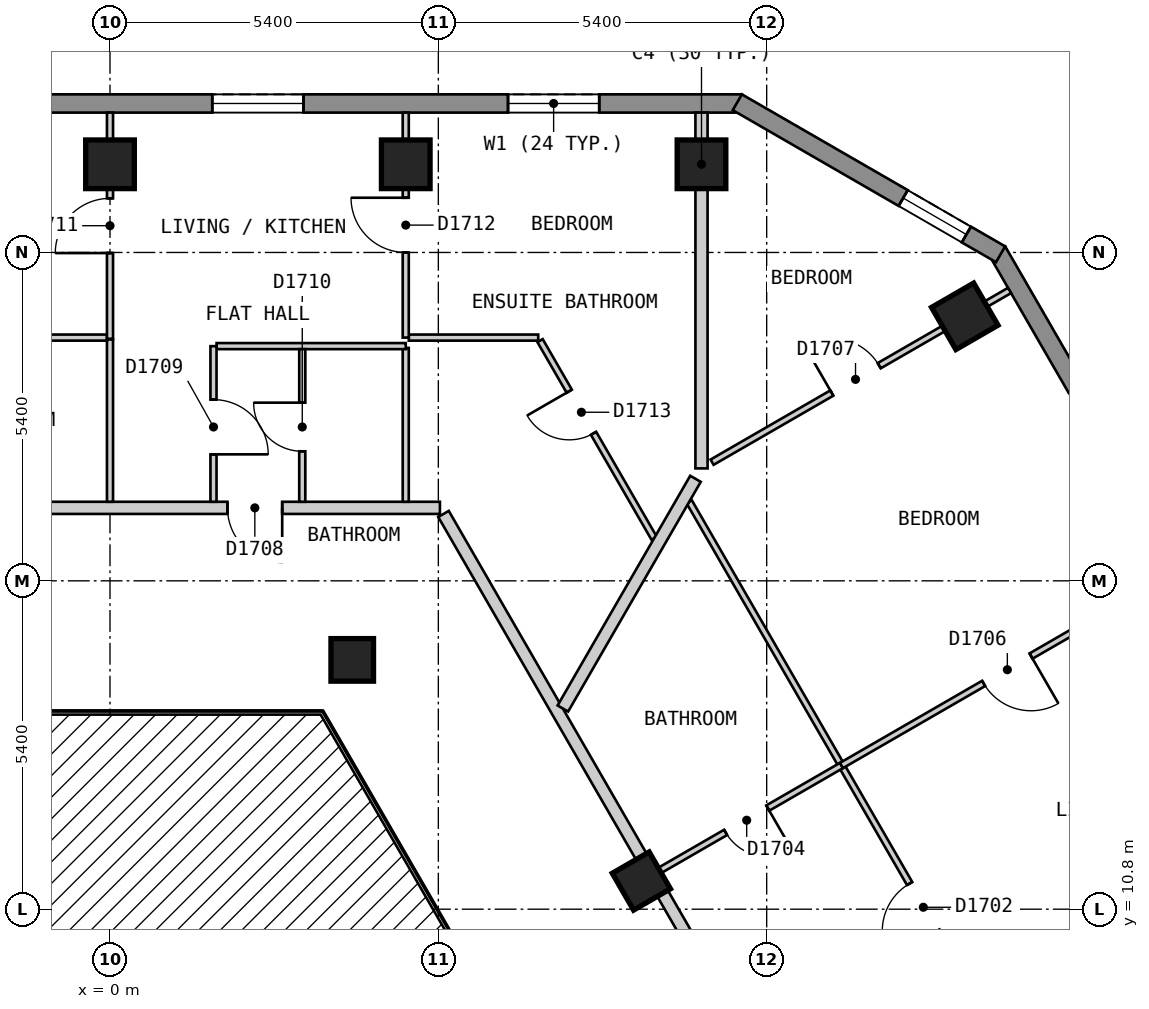
"""IFC4 building model, lengths in metres.
Left out: names, types, materials, properties, quantities, classifications, styles, units other than length and angle.
Written with IfcOpenShell. Run it as: python <this file> out.ifc"""

import sys

from ifc_helpers import new_model, si_unit, direction, frame, frame_2d, origin, origin_2d, place, context, subcontext, project, spatial, polyline, rectangle, outline, extrude, element, fill, save


model = new_model("IFC4")
c1 = context("Model", 3, precision=1e-05, world=origin(), true_north=direction((0.0, 1.0)))
c2 = subcontext(c1, "Body", "Model", "MODEL_VIEW")
j1 = project(units=[si_unit("LENGTHUNIT", "METRE"), si_unit("PLANEANGLEUNIT", "RADIAN")], contexts=[c1])
p1 = place(None, origin())
s1 = spatial("IfcSite", under=j1, at=p1, CompositionType="ELEMENT")
p2 = place(p1, origin())
s2 = spatial("IfcBuilding", under=s1, at=p2, CompositionType="ELEMENT")
p3 = place(p2, frame((0.0, 0.0, 181.2)))
s3 = spatial("IfcBuildingStorey", under=s2, at=p3, CompositionType="ELEMENT", Elevation=181.2)
for number, where, z_axis, x_axis in (
    (1, (9.728, 23.05, 0.0), (0.0, 0.0, 1.0), (-1.0, 0.0, 0.0)),
    (2, (4.864, 23.05, 0.0), (0.0, 0.0, 1.0), (-1.0, 0.0, 0.0)),
    (3, (0.0, 23.05, 0.0), (0.0, 0.0, 1.0), (-1.0, 0.0, 0.0)),
    (4, (14.058, 20.55, 0.0), (0.0, 0.0, 1.0), (-0.5, 0.866, 0.0)),
):
    element("IfcColumn", number, at=place(p3, frame(where, z_axis=z_axis, x_axis=x_axis)), inside=s3, PredefinedType="COLUMN", context=c2, shape_type="SweptSolid", body=[
        extrude(rectangle(XDim=0.8, YDim=0.8, at=origin_2d()), origin(), (0.0, 0.0, 1.0), 3.0),
    ])
for number, where, z_axis, x_axis in (
    (5, (8.739, 11.263, 0.0), (0.0, 0.0, 1.0), (-0.5, 0.866, 0.0)),
    (6, (3.984, 14.9, 0.0), (0.0, 0.0, 1.0), (1.0, 0.0, 0.0)),
):
    element("IfcColumn", number, at=place(p3, frame(where, z_axis=z_axis, x_axis=x_axis)), inside=s3, PredefinedType="COLUMN", context=c2, shape_type="SweptSolid", body=[
        extrude(rectangle(XDim=0.7, YDim=0.7, at=origin_2d()), origin(), (0.0, 0.0, 1.0), 3.0),
    ])
p4 = place(p3, frame((10.392, 24.05, 0.0), z_axis=(0.0, 0.0, 1.0), x_axis=(-1.0, 0.0, 0.0)))
e7 = element("IfcWall", 7, at=p4, inside=s3, PredefinedType="SOLIDWALL", context=c2, shape_type="SweptSolid", body=[
    extrude(outline(polyline([(0.0, -0.15), (20.784, -0.15), (20.704, 0.15), (0.08, 0.15), (0.0, -0.15)])), origin(), (0.0, 0.0, 1.0), 2.7),
])
p5 = place(p4, frame((2.346, 0.0, 0.15)))
e8 = element("IfcOpeningElement", 8, at=p5, cuts=e7, PredefinedType="OPENING", context=c2, shape_type="SweptSolid", body=[
    extrude(rectangle(XDim=1.5, YDim=2.1, at=frame_2d((0.75, 1.05))), frame((0.0, 0.16, 0.0), z_axis=(0.0, -1.0, 0.0), x_axis=(1.0, 0.0, 0.0)), (0.0, 0.0, 1.0), 0.32),
])
p6 = place(p4, frame((7.21, 0.0, 0.15)))
e9 = element("IfcOpeningElement", 9, at=p6, cuts=e7, PredefinedType="OPENING", context=c2, shape_type="SweptSolid", body=[
    extrude(rectangle(XDim=1.5, YDim=2.1, at=frame_2d((0.75, 1.05))), frame((0.0, 0.16, 0.0), z_axis=(0.0, -1.0, 0.0), x_axis=(1.0, 0.0, 0.0)), (0.0, 0.0, 1.0), 0.32),
])
p7 = place(p4, frame((12.074, 0.0, 0.15)))
e10 = element("IfcOpeningElement", 10, at=p7, cuts=e7, PredefinedType="OPENING", context=c2, shape_type="SweptSolid", body=[
    extrude(rectangle(XDim=1.5, YDim=2.1, at=frame_2d((0.75, 1.05))), frame((0.0, 0.16, 0.0), z_axis=(0.0, -1.0, 0.0), x_axis=(1.0, 0.0, 0.0)), (0.0, 0.0, 1.0), 0.32),
])
p8 = place(p4, frame((16.938, 0.0, 0.15)))
e11 = element("IfcOpeningElement", 11, at=p8, cuts=e7, PredefinedType="OPENING", context=c2, shape_type="SweptSolid", body=[
    extrude(rectangle(XDim=1.5, YDim=2.1, at=frame_2d((0.75, 1.05))), frame((0.0, 0.16, 0.0), z_axis=(0.0, -1.0, 0.0), x_axis=(1.0, 0.0, 0.0)), (0.0, 0.0, 1.0), 0.32),
])
p9 = place(p3, frame((26.024, 1.825, 0.0), z_axis=(0.0, 0.0, 1.0), x_axis=(-0.500010537973, 0.866019319597, 0.0)))
e12 = element("IfcWall", 12, at=p9, inside=s3, PredefinedType="SOLIDWALL", context=c2, shape_type="SweptSolid", body=[
    extrude(outline(polyline([(0.0, -0.15), (22.863, -0.15), (22.783, 0.15), (0.08, 0.15), (0.0, -0.15)])), origin(), (0.0, 0.0, 1.0), 2.7),
])
p10 = place(p9, frame((2.606, 0.0, 0.15)))
e13 = element("IfcOpeningElement", 13, at=p10, cuts=e12, PredefinedType="OPENING", context=c2, shape_type="SweptSolid", body=[
    extrude(rectangle(XDim=1.5, YDim=2.1, at=frame_2d((0.75, 1.05))), frame((0.0, 0.16, 0.0), z_axis=(0.0, -1.0, 0.0), x_axis=(1.0, 0.0, 0.0)), (0.0, 0.0, 1.0), 0.32),
])
p11 = place(p9, frame((7.99, 0.0, 0.15)))
e14 = element("IfcOpeningElement", 14, at=p11, cuts=e12, PredefinedType="OPENING", context=c2, shape_type="SweptSolid", body=[
    extrude(rectangle(XDim=1.5, YDim=2.1, at=frame_2d((0.75, 1.05))), frame((0.0, 0.16, 0.0), z_axis=(0.0, -1.0, 0.0), x_axis=(1.0, 0.0, 0.0)), (0.0, 0.0, 1.0), 0.32),
])
p12 = place(p9, frame((13.373, 0.0, 0.15)))
e15 = element("IfcOpeningElement", 15, at=p12, cuts=e12, PredefinedType="OPENING", context=c2, shape_type="SweptSolid", body=[
    extrude(rectangle(XDim=1.5, YDim=2.1, at=frame_2d((0.75, 1.05))), frame((0.0, 0.16, 0.0), z_axis=(0.0, -1.0, 0.0), x_axis=(1.0, 0.0, 0.0)), (0.0, 0.0, 1.0), 0.32),
])
p13 = place(p9, frame((18.758, 0.0, 0.15)))
e16 = element("IfcOpeningElement", 16, at=p13, cuts=e12, PredefinedType="OPENING", context=c2, shape_type="SweptSolid", body=[
    extrude(rectangle(XDim=1.5, YDim=2.1, at=frame_2d((0.75, 1.05))), frame((0.0, 0.16, 0.0), z_axis=(0.0, -1.0, 0.0), x_axis=(1.0, 0.0, 0.0)), (0.0, 0.0, 1.0), 0.32),
])
p14 = place(p3, frame((14.647, 21.57, 0.0), z_axis=(0.0, 0.0, 1.0), x_axis=(-0.866022959057, 0.500004234368, 0.0)))
e17 = element("IfcWall", 17, at=p14, inside=s3, PredefinedType="SOLIDWALL", context=c2, shape_type="SweptSolid", body=[
    extrude(outline(polyline([(0.0, -0.15), (5.0, -0.15), (4.92, 0.15), (0.08, 0.15), (0.0, -0.15)])), origin(), (0.0, 0.0, 1.0), 2.7),
])
p15 = place(p14, frame((0.65, 0.0, 0.15)))
e18 = element("IfcOpeningElement", 18, at=p15, cuts=e17, PredefinedType="OPENING", context=c2, shape_type="SweptSolid", body=[
    extrude(rectangle(XDim=1.2, YDim=2.1, at=frame_2d((0.6, 1.05))), frame((0.0, 0.16, 0.0), z_axis=(0.0, -1.0, 0.0), x_axis=(1.0, 0.0, 0.0)), (0.0, 0.0, 1.0), 0.32),
])
p16 = place(p3, frame((5.485, 17.3, 0.0), z_axis=(0.0, 0.0, 1.0), x_axis=(0.499965832213, -0.866045129667, 0.0)))
e19 = element("IfcWall", 19, at=p16, inside=s3, PredefinedType="PARTITIONING", context=c2, shape_type="SweptSolid", body=[
    extrude(rectangle(XDim=10.739, YDim=0.2, at=frame_2d((5.369, 0.0))), origin(), (0.0, 0.0, 1.0), 2.7),
])
p17 = place(p16, frame((9.047, 0.0, 0.0)))
e20 = element("IfcOpeningElement", 20, at=p17, cuts=e19, PredefinedType="OPENING", context=c2, shape_type="SweptSolid", body=[
    extrude(rectangle(XDim=1.0, YDim=2.1, at=frame_2d((0.5, 1.05))), frame((0.0, 0.11, 0.0), z_axis=(0.0, -1.0, 0.0), x_axis=(1.0, 0.0, 0.0)), (0.0, 0.0, 1.0), 0.22),
])
p18 = place(p3, frame((-5.311, 17.4, 0.0), z_axis=(0.0, 0.0, 1.0), x_axis=(1.0, 0.0, 0.0)))
e21 = element("IfcWall", 21, at=p18, inside=s3, PredefinedType="PARTITIONING", context=c2, shape_type="SweptSolid", body=[
    extrude(rectangle(XDim=10.737, YDim=0.2, at=frame_2d((5.369, 0.0))), origin(), (0.0, 0.0, 1.0), 2.7),
])
p19 = place(p18, frame((7.243, 0.0, 0.0)))
e22 = element("IfcOpeningElement", 22, at=p19, cuts=e21, PredefinedType="OPENING", context=c2, shape_type="SweptSolid", body=[
    extrude(rectangle(XDim=0.9, YDim=2.1, at=frame_2d((0.45, 1.05))), frame((0.0, 0.11, 0.0), z_axis=(0.0, -1.0, 0.0), x_axis=(1.0, 0.0, 0.0)), (0.0, 0.0, 1.0), 0.22),
])
p20 = place(p3, frame((7.073, 20.15, 0.0), z_axis=(0.0, 0.0, 1.0), x_axis=(0.499917691695, -0.866072919292, 0.0)))
e23 = element("IfcWall", 23, at=p20, inside=s3, PredefinedType="PARTITIONING", context=c2, shape_type="SweptSolid", body=[
    extrude(rectangle(XDim=3.753, YDim=0.1, at=frame_2d((1.876, 0.0))), origin(), (0.0, 0.0, 1.0), 2.7),
])
p21 = place(p20, frame((0.96, 0.0, 0.0)))
e24 = element("IfcOpeningElement", 24, at=p21, cuts=e23, PredefinedType="OPENING", context=c2, shape_type="SweptSolid", body=[
    extrude(rectangle(XDim=0.8, YDim=2.1, at=frame_2d((0.4, 1.05))), frame((0.0, 0.06, 0.0), z_axis=(0.0, -1.0, 0.0), x_axis=(1.0, 0.0, 0.0)), (0.0, 0.0, 1.0), 0.12),
])
p22 = place(p3, frame((9.526, 17.5, 0.0), z_axis=(0.0, 0.0, 1.0), x_axis=(0.500019134094, -0.866014356428, 0.0)))
e25 = element("IfcWall", 25, at=p22, inside=s3, PredefinedType="PARTITIONING", context=c2, shape_type="SweptSolid", body=[
    extrude(rectangle(XDim=10.97, YDim=0.1, at=frame_2d((5.485, 0.0))), origin(), (0.0, 0.0, 1.0), 2.7),
])
p23 = place(p22, frame((7.25, 0.0, 0.0)))
e26 = element("IfcOpeningElement", 26, at=p23, cuts=e25, PredefinedType="OPENING", context=c2, shape_type="SweptSolid", body=[
    extrude(rectangle(XDim=0.9, YDim=2.1, at=frame_2d((0.45, 1.05))), frame((0.0, 0.06, 0.0), z_axis=(0.0, -1.0, 0.0), x_axis=(1.0, 0.0, 0.0)), (0.0, 0.0, 1.0), 0.12),
])
p24 = place(p3, frame((0.0, 20.17, 0.0), z_axis=(0.0, 0.0, 1.0), x_axis=(0.0, -1.0, 0.0)))
e27 = element("IfcWall", 27, at=p24, inside=s3, PredefinedType="PARTITIONING", context=c2, shape_type="SweptSolid", body=[
    extrude(rectangle(XDim=2.67, YDim=0.1, at=frame_2d((1.335, 0.0))), origin(), (0.0, 0.0, 1.0), 2.7),
])
p25 = place(p3, frame((4.864, 20.03, 0.0), z_axis=(0.0, 0.0, 1.0), x_axis=(0.0, -1.0, 0.0)))
e28 = element("IfcWall", 28, at=p25, inside=s3, PredefinedType="PARTITIONING", context=c2, shape_type="SweptSolid", body=[
    extrude(rectangle(XDim=2.53, YDim=0.1, at=frame_2d((1.265, 0.0))), origin(), (0.0, 0.0, 1.0), 2.7),
])
p26 = place(p3, frame((1.753, 20.06, 0.0), z_axis=(0.0, 0.0, 1.0), x_axis=(1.0, 0.0, 0.0)))
e29 = element("IfcWall", 29, at=p26, inside=s3, PredefinedType="PARTITIONING", context=c2, shape_type="SweptSolid", body=[
    extrude(rectangle(XDim=3.111, YDim=0.1, at=frame_2d((1.556, 0.0))), origin(), (0.0, 0.0, 1.0), 2.7),
])
p27 = place(p3, frame((-6.985, 20.2, 0.0), z_axis=(0.0, 0.0, 1.0), x_axis=(1.0, 0.0, 0.0)))
e30 = element("IfcWall", 30, at=p27, inside=s3, PredefinedType="PARTITIONING", context=c2, shape_type="SweptSolid", body=[
    extrude(rectangle(XDim=6.935, YDim=0.1, at=frame_2d((3.468, 0.0))), origin(), (0.0, 0.0, 1.0), 2.7),
])
p28 = place(p27, frame((4.153, 0.0, 0.0)))
e31 = element("IfcOpeningElement", 31, at=p28, cuts=e30, PredefinedType="OPENING", context=c2, shape_type="SweptSolid", body=[
    extrude(rectangle(XDim=0.8, YDim=2.1, at=frame_2d((0.4, 1.05))), frame((0.0, 0.06, 0.0), z_axis=(0.0, -1.0, 0.0), x_axis=(1.0, 0.0, 0.0)), (0.0, 0.0, 1.0), 0.12),
])
p29 = place(p3, frame((4.914, 20.2, 0.0), z_axis=(0.0, 0.0, 1.0), x_axis=(1.0, 0.0, 0.0)))
e32 = element("IfcWall", 32, at=p29, inside=s3, PredefinedType="PARTITIONING", context=c2, shape_type="SweptSolid", body=[
    extrude(rectangle(XDim=2.129, YDim=0.1, at=frame_2d((1.064, 0.0))), origin(), (0.0, 0.0, 1.0), 2.7),
])
p30 = place(p3, frame((3.162, 17.5, 0.0), z_axis=(0.0, 0.0, 1.0), x_axis=(0.0, 1.0, 0.0)))
e33 = element("IfcWall", 33, at=p30, inside=s3, PredefinedType="PARTITIONING", context=c2, shape_type="SweptSolid", body=[
    extrude(rectangle(XDim=2.51, YDim=0.1, at=frame_2d((1.255, 0.0))), origin(), (0.0, 0.0, 1.0), 2.7),
])
p31 = place(p30, frame((0.83, 0.0, 0.0)))
e34 = element("IfcOpeningElement", 34, at=p31, cuts=e33, PredefinedType="OPENING", context=c2, shape_type="SweptSolid", body=[
    extrude(rectangle(XDim=0.8, YDim=2.1, at=frame_2d((0.4, 1.05))), frame((0.0, 0.06, 0.0), z_axis=(0.0, -1.0, 0.0), x_axis=(1.0, 0.0, 0.0)), (0.0, 0.0, 1.0), 0.12),
])
p32 = place(p3, frame((4.864, 20.2, 0.0), z_axis=(0.0, 0.0, 1.0), x_axis=(0.0, 1.0, 0.0)))
e35 = element("IfcWall", 35, at=p32, inside=s3, PredefinedType="PARTITIONING", context=c2, shape_type="SweptSolid", body=[
    extrude(rectangle(XDim=3.7, YDim=0.1, at=frame_2d((1.85, 0.0))), origin(), (0.0, 0.0, 1.0), 2.7),
])
p33 = place(p32, frame((1.4, 0.0, 0.0)))
e36 = element("IfcOpeningElement", 36, at=p33, cuts=e35, PredefinedType="OPENING", context=c2, shape_type="SweptSolid", body=[
    extrude(rectangle(XDim=0.9, YDim=2.1, at=frame_2d((0.45, 1.05))), frame((0.0, 0.06, 0.0), z_axis=(0.0, -1.0, 0.0), x_axis=(1.0, 0.0, 0.0)), (0.0, 0.0, 1.0), 0.12),
])
p34 = place(p3, frame((1.702, 17.5, 0.0), z_axis=(0.0, 0.0, 1.0), x_axis=(0.0, 1.0, 0.0)))
e37 = element("IfcWall", 37, at=p34, inside=s3, PredefinedType="PARTITIONING", context=c2, shape_type="SweptSolid", body=[
    extrude(rectangle(XDim=2.559, YDim=0.1, at=frame_2d((1.28, 0.0))), origin(), (0.0, 0.0, 1.0), 2.7),
])
p35 = place(p34, frame((0.78, 0.0, 0.0)))
e38 = element("IfcOpeningElement", 38, at=p35, cuts=e37, PredefinedType="OPENING", context=c2, shape_type="SweptSolid", body=[
    extrude(rectangle(XDim=0.9, YDim=2.1, at=frame_2d((0.45, 1.05))), frame((0.0, 0.06, 0.0), z_axis=(0.0, -1.0, 0.0), x_axis=(1.0, 0.0, 0.0)), (0.0, 0.0, 1.0), 0.12),
])
p36 = place(p3, frame((0.0, 20.18, 0.0), z_axis=(0.0, 0.0, 1.0), x_axis=(0.0, 1.0, 0.0)))
e39 = element("IfcWall", 39, at=p36, inside=s3, PredefinedType="PARTITIONING", context=c2, shape_type="SweptSolid", body=[
    extrude(rectangle(XDim=3.72, YDim=0.1, at=frame_2d((1.86, 0.0))), origin(), (0.0, 0.0, 1.0), 2.7),
])
p37 = place(p36, frame((1.41, 0.0, 0.0)))
e40 = element("IfcOpeningElement", 40, at=p37, cuts=e39, PredefinedType="OPENING", context=c2, shape_type="SweptSolid", body=[
    extrude(rectangle(XDim=0.9, YDim=2.1, at=frame_2d((0.45, 1.05))), frame((0.0, 0.06, 0.0), z_axis=(0.0, -1.0, 0.0), x_axis=(1.0, 0.0, 0.0)), (0.0, 0.0, 1.0), 0.12),
])
p38 = place(p3, frame((8.999, 11.413, 0.0), z_axis=(0.0, 0.0, 1.0), x_axis=(0.866019471182, 0.500010275428, 0.0)))
e41 = element("IfcWall", 41, at=p38, inside=s3, PredefinedType="PARTITIONING", context=c2, shape_type="SweptSolid", body=[
    extrude(rectangle(XDim=3.5, YDim=0.1, at=frame_2d((1.75, 0.0))), origin(), (0.0, 0.0, 1.0), 2.7),
])
p39 = place(p38, frame((1.3, 0.0, 0.0)))
e42 = element("IfcOpeningElement", 42, at=p39, cuts=e41, PredefinedType="OPENING", context=c2, shape_type="SweptSolid", body=[
    extrude(rectangle(XDim=0.8, YDim=2.1, at=frame_2d((0.4, 1.05))), frame((0.0, 0.06, 0.0), z_axis=(0.0, -1.0, 0.0), x_axis=(1.0, 0.0, 0.0)), (0.0, 0.0, 1.0), 0.12),
])
p40 = place(p3, frame((9.902, 18.151, 0.0), z_axis=(0.0, 0.0, 1.0), x_axis=(0.866032278734, 0.499988092049, 0.0)))
e43 = element("IfcWall", 43, at=p40, inside=s3, PredefinedType="PARTITIONING", context=c2, shape_type="SweptSolid", body=[
    extrude(rectangle(XDim=5.649, YDim=0.1, at=frame_2d((2.824, 0.0))), origin(), (0.0, 0.0, 1.0), 2.7),
])
p41 = place(p40, frame((2.274, 0.0, 0.0)))
e44 = element("IfcOpeningElement", 44, at=p41, cuts=e43, PredefinedType="OPENING", context=c2, shape_type="SweptSolid", body=[
    extrude(rectangle(XDim=0.9, YDim=2.1, at=frame_2d((0.45, 1.05))), frame((0.0, 0.06, 0.0), z_axis=(0.0, -1.0, 0.0), x_axis=(1.0, 0.0, 0.0)), (0.0, 0.0, 1.0), 0.12),
])
p42 = place(p3, frame((7.448, 14.1, 0.0), z_axis=(0.0, 0.0, 1.0), x_axis=(0.499961462843, 0.866047652079, 0.0)))
e45 = element("IfcWall", 45, at=p42, inside=s3, PredefinedType="PARTITIONING", context=c2, shape_type="SweptSolid", body=[
    extrude(rectangle(XDim=4.362, YDim=0.2, at=frame_2d((2.181, 0.0))), origin(), (0.0, 0.0, 1.0), 2.7),
])
p43 = place(p3, frame((9.728, 18.049, 0.0), z_axis=(0.0, 0.0, 1.0), x_axis=(0.0, 1.0, 0.0)))
e46 = element("IfcWall", 46, at=p43, inside=s3, PredefinedType="PARTITIONING", context=c2, shape_type="SweptSolid", body=[
    extrude(rectangle(XDim=5.851, YDim=0.2, at=frame_2d((2.925, 0.0))), origin(), (0.0, 0.0, 1.0), 2.7),
])
p44 = place(p3, frame((14.722, 8.5, 0.0), z_axis=(0.0, 0.0, 1.0), x_axis=(0.866035871367, 0.499981869177, 0.0)))
e47 = element("IfcWall", 47, at=p44, inside=s3, PredefinedType="PARTITIONING", context=c2, shape_type="SweptSolid", body=[
    extrude(rectangle(XDim=6.3, YDim=0.1, at=frame_2d((3.15, 0.0))), origin(), (0.0, 0.0, 1.0), 2.7),
])
p45 = place(p44, frame((2.7, 0.0, 0.0)))
e48 = element("IfcOpeningElement", 48, at=p45, cuts=e47, PredefinedType="OPENING", context=c2, shape_type="SweptSolid", body=[
    extrude(rectangle(XDim=0.9, YDim=2.1, at=frame_2d((0.45, 1.05))), frame((0.0, 0.06, 0.0), z_axis=(0.0, -1.0, 0.0), x_axis=(1.0, 0.0, 0.0)), (0.0, 0.0, 1.0), 0.12),
])
p46 = place(p3, frame((12.03, 13.163, 0.0), z_axis=(0.0, 0.0, 1.0), x_axis=(0.866035871367, 0.499981869177, 0.0)))
e49 = element("IfcWall", 49, at=p46, inside=s3, PredefinedType="PARTITIONING", context=c2, shape_type="SweptSolid", body=[
    extrude(rectangle(XDim=6.3, YDim=0.1, at=frame_2d((3.15, 0.0))), origin(), (0.0, 0.0, 1.0), 2.7),
])
p47 = place(p46, frame((2.7, 0.0, 0.0)))
e50 = element("IfcOpeningElement", 50, at=p47, cuts=e49, PredefinedType="OPENING", context=c2, shape_type="SweptSolid", body=[
    extrude(rectangle(XDim=0.9, YDim=2.1, at=frame_2d((0.45, 1.05))), frame((0.0, 0.06, 0.0), z_axis=(0.0, -1.0, 0.0), x_axis=(1.0, 0.0, 0.0)), (0.0, 0.0, 1.0), 0.12),
])
p48 = place(p5, origin())
e51 = element("IfcWindow", 51, at=p48, inside=s3, PartitioningType="SINGLE_PANEL", PredefinedType="WINDOW", context=c2, shape_type="SweptSolid", body=[
    extrude(rectangle(XDim=1.5, YDim=2.1, at=frame_2d((0.75, 1.05))), frame((0.0, 0.03, 0.0), z_axis=(0.0, -1.0, 0.0), x_axis=(1.0, 0.0, 0.0)), (0.0, 0.0, 1.0), 0.06),
])
fill(e8, e51)
p49 = place(p6, origin())
e52 = element("IfcWindow", 52, at=p49, inside=s3, PartitioningType="SINGLE_PANEL", PredefinedType="WINDOW", context=c2, shape_type="SweptSolid", body=[
    extrude(rectangle(XDim=1.5, YDim=2.1, at=frame_2d((0.75, 1.05))), frame((0.0, 0.03, 0.0), z_axis=(0.0, -1.0, 0.0), x_axis=(1.0, 0.0, 0.0)), (0.0, 0.0, 1.0), 0.06),
])
fill(e9, e52)
p50 = place(p15, origin())
e53 = element("IfcWindow", 53, at=p50, inside=s3, PartitioningType="SINGLE_PANEL", PredefinedType="WINDOW", context=c2, shape_type="SweptSolid", body=[
    extrude(rectangle(XDim=1.2, YDim=2.1, at=frame_2d((0.6, 1.05))), frame((0.0, 0.03, 0.0), z_axis=(0.0, -1.0, 0.0), x_axis=(1.0, 0.0, 0.0)), (0.0, 0.0, 1.0), 0.06),
])
fill(e18, e53)
p51 = place(p23, origin())
e54 = element("IfcDoor", 54, at=p51, inside=s3, OperationType="SINGLE_SWING_RIGHT", PredefinedType="DOOR", context=c2, shape_type="SweptSolid", body=[
    extrude(rectangle(XDim=0.9, YDim=2.1, at=frame_2d((0.45, 1.05))), frame((0.0, 0.025, 0.0), z_axis=(0.0, -1.0, 0.0), x_axis=(1.0, 0.0, 0.0)), (0.0, 0.0, 1.0), 0.05),
])
fill(e26, e54)
p52 = place(p39, origin())
e55 = element("IfcDoor", 55, at=p52, inside=s3, OperationType="SINGLE_SWING_RIGHT", PredefinedType="DOOR", context=c2, shape_type="SweptSolid", body=[
    extrude(rectangle(XDim=0.8, YDim=2.1, at=frame_2d((0.4, 1.05))), frame((0.0, 0.025, 0.0), z_axis=(0.0, -1.0, 0.0), x_axis=(1.0, 0.0, 0.0)), (0.0, 0.0, 1.0), 0.05),
])
fill(e42, e55)
p53 = place(p47, origin())
e56 = element("IfcDoor", 56, at=p53, inside=s3, OperationType="SINGLE_SWING_RIGHT", PredefinedType="DOOR", context=c2, shape_type="SweptSolid", body=[
    extrude(rectangle(XDim=0.9, YDim=2.1, at=frame_2d((0.45, 1.05))), frame((0.0, 0.025, 0.0), z_axis=(0.0, -1.0, 0.0), x_axis=(1.0, 0.0, 0.0)), (0.0, 0.0, 1.0), 0.05),
])
fill(e50, e56)
p54 = place(p41, origin())
e57 = element("IfcDoor", 57, at=p54, inside=s3, OperationType="SINGLE_SWING_LEFT", PredefinedType="DOOR", context=c2, shape_type="SweptSolid", body=[
    extrude(rectangle(XDim=0.9, YDim=2.1, at=frame_2d((0.45, 1.05))), frame((0.0, 0.025, 0.0), z_axis=(0.0, -1.0, 0.0), x_axis=(1.0, 0.0, 0.0)), (0.0, 0.0, 1.0), 0.05),
])
fill(e44, e57)
p55 = place(p19, origin())
e58 = element("IfcDoor", 58, at=p55, inside=s3, OperationType="SINGLE_SWING_RIGHT", PredefinedType="DOOR", context=c2, shape_type="SweptSolid", body=[
    extrude(rectangle(XDim=0.9, YDim=2.1, at=frame_2d((0.45, 1.05))), frame((0.0, 0.025, 0.0), z_axis=(0.0, -1.0, 0.0), x_axis=(1.0, 0.0, 0.0)), (0.0, 0.0, 1.0), 0.05),
])
fill(e22, e58)
p56 = place(p35, origin())
e59 = element("IfcDoor", 59, at=p56, inside=s3, OperationType="SINGLE_SWING_LEFT", PredefinedType="DOOR", context=c2, shape_type="SweptSolid", body=[
    extrude(rectangle(XDim=0.9, YDim=2.1, at=frame_2d((0.45, 1.05))), frame((0.0, 0.025, 0.0), z_axis=(0.0, -1.0, 0.0), x_axis=(1.0, 0.0, 0.0)), (0.0, 0.0, 1.0), 0.05),
])
fill(e38, e59)
p57 = place(p31, origin())
e60 = element("IfcDoor", 60, at=p57, inside=s3, OperationType="SINGLE_SWING_RIGHT", PredefinedType="DOOR", context=c2, shape_type="SweptSolid", body=[
    extrude(rectangle(XDim=0.8, YDim=2.1, at=frame_2d((0.4, 1.05))), frame((0.0, 0.025, 0.0), z_axis=(0.0, -1.0, 0.0), x_axis=(1.0, 0.0, 0.0)), (0.0, 0.0, 1.0), 0.05),
])
fill(e34, e60)
p58 = place(p37, origin())
e61 = element("IfcDoor", 61, at=p58, inside=s3, OperationType="SINGLE_SWING_LEFT", PredefinedType="DOOR", context=c2, shape_type="SweptSolid", body=[
    extrude(rectangle(XDim=0.9, YDim=2.1, at=frame_2d((0.45, 1.05))), frame((0.0, 0.025, 0.0), z_axis=(0.0, -1.0, 0.0), x_axis=(1.0, 0.0, 0.0)), (0.0, 0.0, 1.0), 0.05),
])
fill(e40, e61)
p59 = place(p33, origin())
e62 = element("IfcDoor", 62, at=p59, inside=s3, OperationType="SINGLE_SWING_RIGHT", PredefinedType="DOOR", context=c2, shape_type="SweptSolid", body=[
    extrude(rectangle(XDim=0.9, YDim=2.1, at=frame_2d((0.45, 1.05))), frame((0.0, 0.025, 0.0), z_axis=(0.0, -1.0, 0.0), x_axis=(1.0, 0.0, 0.0)), (0.0, 0.0, 1.0), 0.05),
])
fill(e36, e62)
p60 = place(p21, origin())
e63 = element("IfcDoor", 63, at=p60, inside=s3, OperationType="SINGLE_SWING_LEFT", PredefinedType="DOOR", context=c2, shape_type="SweptSolid", body=[
    extrude(rectangle(XDim=0.8, YDim=2.1, at=frame_2d((0.4, 1.05))), frame((0.0, 0.025, 0.0), z_axis=(0.0, -1.0, 0.0), x_axis=(1.0, 0.0, 0.0)), (0.0, 0.0, 1.0), 0.05),
])
fill(e24, e63)
save(model, sys.argv[1])
